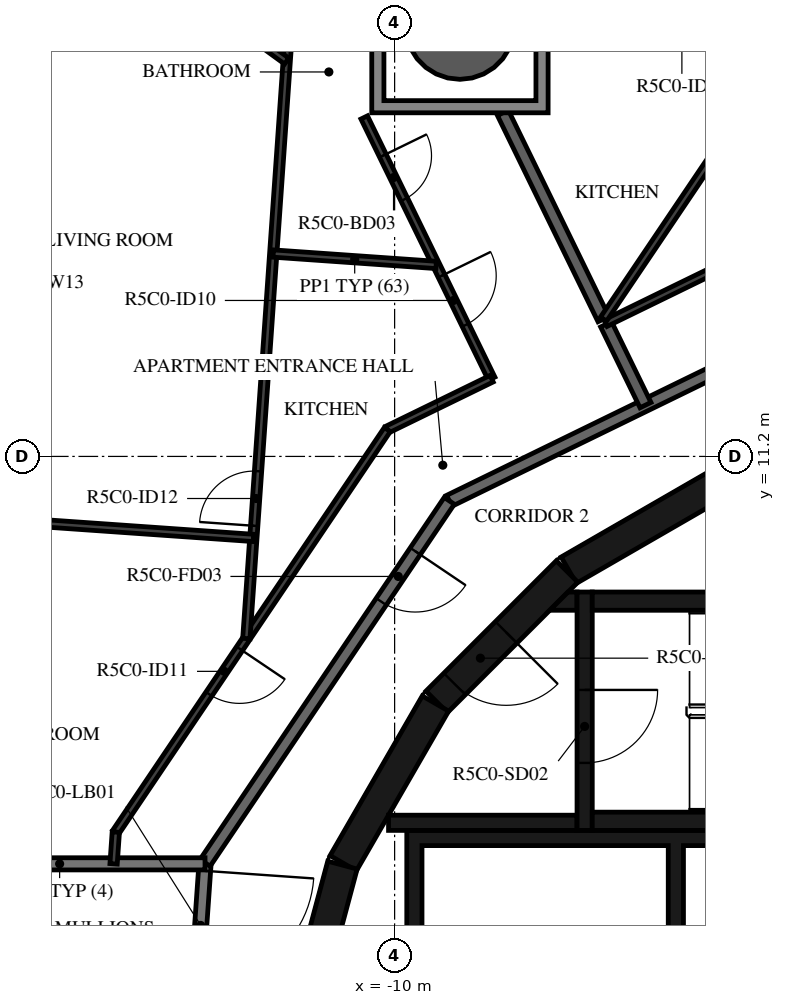
"""IFC4 building model, lengths in metres.
Left out: names, types, materials, properties, quantities, classifications, styles, units other than length and angle.
Written with IfcOpenShell. Run it as: python <this file> out.ifc"""

import sys

from ifc_helpers import new_model, si_unit, direction, frame, frame_2d, origin, origin_2d, place, context, subcontext, project, spatial, polyline, rectangle, hollow_circle, outline, extrude, element, fill, save


model = new_model("IFC4")
c1 = context("Model", 3, precision=1e-05, world=origin(), true_north=direction((0.0, 1.0)))
c2 = subcontext(c1, "Body", "Model", "MODEL_VIEW")
j1 = project(units=[si_unit("LENGTHUNIT", "METRE"), si_unit("PLANEANGLEUNIT", "RADIAN")], contexts=[c1])
p1 = place(None, origin())
s1 = spatial("IfcSite", under=j1, at=p1, CompositionType="ELEMENT")
p2 = place(p1, origin())
s2 = spatial("IfcBuilding", under=s1, at=p2, CompositionType="ELEMENT")
p3 = place(p2, frame((0.0, 0.0, 216.4)))
s3 = spatial("IfcBuildingStorey", under=s2, at=p3, CompositionType="ELEMENT", Elevation=216.4)
p4 = place(p3, frame((-8.926, 18.301, -0.38), z_axis=(0.0, 0.0, 1.0), x_axis=(1.0, 0.0, 0.0)))
e1 = element("IfcColumn", 1, at=p4, inside=s3, PredefinedType="COLUMN", context=c2, shape_type="SweptSolid", body=[
    extrude(hollow_circle(Radius=0.9, WallThickness=0.04, at=origin_2d()), origin(), (0.0, 0.0, 1.0), 2.616),
])
p5 = place(p3, frame((-4.51, 10.845, 0.0), z_axis=(0.0, 0.0, 1.0), x_axis=(-0.865975092491, -0.500087131594, 0.0)))
e2 = element("IfcWall", 2, at=p5, inside=s3, PredefinedType="SHEAR", context=c2, shape_type="SweptSolid", body=[
    extrude(rectangle(XDim=3.033, YDim=0.5, at=frame_2d((1.516, 0.0))), origin(), (0.0, 0.0, 1.0), 3.05),
])
p6 = place(p3, frame((-7.164, 9.308, 0.0), z_axis=(0.0, 0.0, 1.0), x_axis=(-0.707106781187, -0.707106781187, 0.0)))
e3 = element("IfcWall", 3, at=p6, inside=s3, PredefinedType="SHEAR", context=c2, shape_type="SweptSolid", body=[
    extrude(rectangle(XDim=3.032, YDim=0.5, at=frame_2d((1.516, 0.0))), origin(), (0.0, 0.0, 1.0), 3.05),
])
p7 = place(p6, frame((1.416, 0.0, 0.0)))
e4 = element("IfcOpeningElement", 4, at=p7, cuts=e3, PredefinedType="OPENING", context=c2, shape_type="SweptSolid", body=[
    extrude(rectangle(XDim=1.2, YDim=2.1, at=frame_2d((0.6, 1.05))), frame((0.0, 0.26, 0.0), z_axis=(0.0, -1.0, 0.0), x_axis=(1.0, 0.0, 0.0)), (0.0, 0.0, 1.0), 0.52),
])
for number, where, z_axis, x_axis in (
    (5, (-9.329, 7.137, 0.0), (0.0, 0.0, 1.0), (-0.5, -0.866, 0.0)),
    (6, (-10.858, 4.479, 0.0), (0.0, 0.0, 1.0), (-0.259, -0.966, 0.0)),
):
    element("IfcWall", number, at=place(p3, frame(where, z_axis=z_axis, x_axis=x_axis)), inside=s3, PredefinedType="SHEAR", context=c2, shape_type="SweptSolid", body=[
        extrude(rectangle(XDim=3.033, YDim=0.5, at=frame_2d((1.516, 0.0))), origin(), (0.0, 0.0, 1.0), 3.05),
    ])
for number, where, z_axis, x_axis in (
    (7, (-6.75, 5.2, 0.0), (0.0, 0.0, 1.0), (1.0, 0.0, 0.0)),
    (8, (-6.75, 8.82, 0.0), (0.0, 0.0, 1.0), (1.0, 0.0, 0.0)),
):
    element("IfcWall", number, at=place(p3, frame(where, z_axis=z_axis, x_axis=x_axis)), inside=s3, PredefinedType="SHEAR", context=c2, shape_type="SweptSolid", body=[
        extrude(rectangle(XDim=6.75, YDim=0.3, at=frame_2d((3.375, 0.0))), origin(), (0.0, 0.0, 1.0), 3.05),
    ])
p8 = place(p3, frame((-6.875, 8.97, 0.0), z_axis=(0.0, 0.0, 1.0), x_axis=(0.0, -1.0, 0.0)))
e9 = element("IfcWall", 9, at=p8, inside=s3, PredefinedType="SHEAR", context=c2, shape_type="SweptSolid", body=[
    extrude(rectangle(XDim=3.92, YDim=0.25, at=frame_2d((1.96, 0.0))), origin(), (0.0, 0.0, 1.0), 3.05),
])
p9 = place(p8, frame((1.61, 0.0, 0.0)))
e10 = element("IfcOpeningElement", 10, at=p9, cuts=e9, PredefinedType="OPENING", context=c2, shape_type="SweptSolid", body=[
    extrude(rectangle(XDim=1.2, YDim=2.1, at=frame_2d((0.6, 1.05))), frame((0.0, 0.135, 0.0), z_axis=(0.0, -1.0, 0.0), x_axis=(1.0, 0.0, 0.0)), (0.0, 0.0, 1.0), 0.27),
])
p10 = place(p3, frame((-7.0, 5.175, 0.0), z_axis=(0.0, 0.0, 1.0), x_axis=(-1.0, 0.0, 0.0)))
e11 = element("IfcWall", 11, at=p10, inside=s3, PredefinedType="SHEAR", context=c2, shape_type="SweptSolid", body=[
    extrude(rectangle(XDim=3.1, YDim=0.25, at=frame_2d((1.55, 0.0))), origin(), (0.0, 0.0, 1.0), 3.05),
])
p11 = place(p3, origin())
e12 = element("IfcWall", 12, at=p11, inside=s3, PredefinedType="SHEAR", context=c2, shape_type="SweptSolid", body=[
    extrude(outline(polyline([(-7.148, 8.97), (-7.0, 8.97), (-7.0, 8.67), (-7.448, 8.67), (-7.148, 8.97)])), origin(), (0.0, 0.0, 1.0), 3.05),
])
p12 = place(p3, origin())
e13 = element("IfcWall", 13, at=p12, inside=s3, PredefinedType="SHEAR", context=c2, shape_type="SweptSolid", body=[
    extrude(outline(polyline([(-9.55, 4.8), (-5.5, 4.8), (-5.5, 1.9), (-5.25, 1.9), (-5.25, 4.8), (-1.2, 4.8), (-1.2, 1.9), (-0.95, 1.9), (-0.95, 4.8), (0.95, 4.8), (0.95, 1.9), (1.2, 1.9), (1.2, 4.8), (3.1, 4.8), (3.1, 1.9), (3.35, 1.9), (3.35, 4.8), (5.25, 4.8), (5.25, 1.9), (5.5, 1.9), (5.5, 4.8), (7.4, 4.8), (7.4, 1.9), (7.65, 1.9), (7.65, 4.8), (9.55, 4.8), (9.55, 1.9), (9.8, 1.9), (9.8, 4.8), (9.8, 5.05), (-9.8, 5.05), (-9.8, 4.8), (-9.8, 1.9), (-9.55, 1.9), (-9.55, 4.8)])), origin(), (0.0, 0.0, 1.0), 3.05),
])
p13 = place(p3, frame((-13.118, 4.5, 0.0), z_axis=(0.0, 0.0, 1.0), x_axis=(-0.069746872611, -0.99756472159, 0.0)))
e14 = element("IfcWall", 14, at=p13, inside=s3, PredefinedType="STANDARD", context=c2, shape_type="SweptSolid", body=[
    extrude(rectangle(XDim=3.574, YDim=0.2, at=frame_2d((1.787, 0.0))), origin(), (0.0, 0.0, 1.0), 3.05),
])
p14 = place(p13, frame((0.115, 0.0, 0.0)))
e15 = element("IfcOpeningElement", 15, at=p14, cuts=e14, PredefinedType="OPENING", context=c2, shape_type="SweptSolid", body=[
    extrude(rectangle(XDim=1.8, YDim=2.1, at=frame_2d((0.9, 1.05))), frame((0.0, 0.11, 0.0), z_axis=(0.0, -1.0, 0.0), x_axis=(1.0, 0.0, 0.0)), (0.0, 0.0, 1.0), 0.22),
])
p15 = place(p3, frame((-2.647, 13.618, 0.0), z_axis=(0.0, 0.0, 1.0), x_axis=(-0.898796543751, -0.438366026218, 0.0)))
e16 = element("IfcWall", 16, at=p15, inside=s3, PredefinedType="STANDARD", context=c2, shape_type="SweptSolid", body=[
    extrude(rectangle(XDim=7.181, YDim=0.2, at=frame_2d((3.591, 0.0))), origin(), (0.0, 0.0, 1.0), 3.05),
])
p16 = place(p3, frame((-9.101, 10.47, 0.0), z_axis=(0.0, 0.0, 1.0), x_axis=(-0.559195469534, -0.829035841718, 0.0)))
e17 = element("IfcWall", 17, at=p16, inside=s3, PredefinedType="STANDARD", context=c2, shape_type="SweptSolid", body=[
    extrude(rectangle(XDim=7.181, YDim=0.2, at=frame_2d((3.591, 0.0))), origin(), (0.0, 0.0, 1.0), 3.05),
])
p17 = place(p16, frame((1.0, 0.0, 0.0)))
e18 = element("IfcOpeningElement", 18, at=p17, cuts=e17, PredefinedType="OPENING", context=c2, shape_type="SweptSolid", body=[
    extrude(rectangle(XDim=1.0, YDim=2.1, at=frame_2d((0.5, 1.05))), frame((0.0, 0.11, 0.0), z_axis=(0.0, -1.0, 0.0), x_axis=(1.0, 0.0, 0.0)), (0.0, 0.0, 1.0), 0.22),
])
p18 = place(p3, frame((-13.118, 4.5, 0.0), z_axis=(0.0, 0.0, 1.0), x_axis=(-1.0, 0.0, 0.0)))
e19 = element("IfcWall", 19, at=p18, inside=s3, PredefinedType="STANDARD", context=c2, shape_type="SweptSolid", body=[
    extrude(rectangle(XDim=4.782, YDim=0.2, at=frame_2d((2.391, 0.0))), origin(), (0.0, 0.0, 1.0), 3.05),
])
p19 = place(p3, frame((-6.522, 13.373, 0.0), z_axis=(0.0, 0.0, 1.0), x_axis=(0.438277270821, -0.8988398266, 0.0)))
e20 = element("IfcWall", 20, at=p19, inside=s3, PredefinedType="STANDARD", context=c2, shape_type="SweptSolid", body=[
    extrude(rectangle(XDim=1.479, YDim=0.2, at=frame_2d((0.74, 0.0))), origin(), (0.0, 0.0, 1.0), 3.05),
])
p20 = place(p3, frame((-8.219, 16.851, 0.0), z_axis=(0.0, 0.0, 1.0), x_axis=(0.438291091101, -0.898833087654, 0.0)))
e21 = element("IfcWall", 21, at=p20, inside=s3, PredefinedType="STANDARD", context=c2, shape_type="SweptSolid", body=[
    extrude(rectangle(XDim=3.774, YDim=0.2, at=frame_2d((1.887, 0.0))), origin(), (0.0, 0.0, 1.0), 3.05),
])
p21 = place(p3, frame((-2.943, 15.142, 0.0), z_axis=(0.0, 0.0, 1.0), x_axis=(-0.89881075705, -0.438336883014, 0.0)))
e22 = element("IfcWall", 22, at=p21, inside=s3, PredefinedType="PARTITIONING", context=c2, shape_type="SweptSolid", body=[
    extrude(rectangle(XDim=3.992, YDim=0.12, at=frame_2d((1.996, 0.0))), origin(), (0.0, 0.0, 1.0), 3.05),
])
p22 = place(p3, frame((-7.476, 19.735, 0.0), z_axis=(0.0, 0.0, 1.0), x_axis=(0.829035412992, -0.559196105142, 0.0)))
e23 = element("IfcWall", 23, at=p22, inside=s3, PredefinedType="PARTITIONING", context=c2, shape_type="SweptSolid", body=[
    extrude(rectangle(XDim=8.531, YDim=0.12, at=frame_2d((4.266, 0.0))), origin(), (0.0, 0.0, 1.0), 3.05),
])
p23 = place(p22, frame((2.204, 0.0, 0.0)))
e24 = element("IfcOpeningElement", 24, at=p23, cuts=e23, PredefinedType="OPENING", context=c2, shape_type="SweptSolid", body=[
    extrude(rectangle(XDim=0.9, YDim=2.1, at=frame_2d((0.45, 1.05))), frame((0.0, 0.07, 0.0), z_axis=(0.0, -1.0, 0.0), x_axis=(1.0, 0.0, 0.0)), (0.0, 0.0, 1.0), 0.14),
])
p24 = place(p3, frame((-3.939, 17.35, 0.0), z_axis=(0.0, 0.0, 1.0), x_axis=(-0.559193216274, -0.829037361566, 0.0)))
e25 = element("IfcWall", 25, at=p24, inside=s3, PredefinedType="PARTITIONING", context=c2, shape_type="SweptSolid", body=[
    extrude(rectangle(XDim=4.694, YDim=0.12, at=frame_2d((2.347, 0.0))), origin(), (0.0, 0.0, 1.0), 3.05),
])
p25 = place(p3, frame((-10.5, 16.775, 0.0), z_axis=(0.0, 0.0, 1.0), x_axis=(0.438345136783, -0.898806731761, 0.0)))
e26 = element("IfcWall", 26, at=p25, inside=s3, PredefinedType="PARTITIONING", context=c2, shape_type="SweptSolid", body=[
    extrude(rectangle(XDim=4.78, YDim=0.12, at=frame_2d((2.39, 0.0))), origin(), (0.0, 0.0, 1.0), 3.05),
])
p26 = place(p25, frame((0.7, 0.0, 0.0)))
e27 = element("IfcOpeningElement", 27, at=p26, cuts=e26, PredefinedType="OPENING", context=c2, shape_type="SweptSolid", body=[
    extrude(rectangle(XDim=0.8, YDim=2.1, at=frame_2d((0.4, 1.05))), frame((0.0, 0.07, 0.0), z_axis=(0.0, -1.0, 0.0), x_axis=(1.0, 0.0, 0.0)), (0.0, 0.0, 1.0), 0.14),
])
p27 = place(p25, frame((2.899, 0.0, 0.0)))
e28 = element("IfcOpeningElement", 28, at=p27, cuts=e26, PredefinedType="OPENING", context=c2, shape_type="SweptSolid", body=[
    extrude(rectangle(XDim=0.9, YDim=2.1, at=frame_2d((0.45, 1.05))), frame((0.0, 0.07, 0.0), z_axis=(0.0, -1.0, 0.0), x_axis=(1.0, 0.0, 0.0)), (0.0, 0.0, 1.0), 0.14),
])
p28 = place(p3, frame((-8.405, 12.479, 0.0), z_axis=(0.0, 0.0, 1.0), x_axis=(-0.898784427692, -0.438390867307, 0.0)))
e29 = element("IfcWall", 29, at=p28, inside=s3, PredefinedType="PARTITIONING", context=c2, shape_type="SweptSolid", body=[
    extrude(rectangle(XDim=1.908, YDim=0.12, at=frame_2d((0.954, 0.0))), origin(), (0.0, 0.0, 1.0), 3.05),
])
p29 = place(p3, frame((-10.12, 11.642, 0.0), z_axis=(0.0, 0.0, 1.0), x_axis=(-0.55920080659, -0.829032241779, 0.0)))
e30 = element("IfcWall", 30, at=p29, inside=s3, PredefinedType="PARTITIONING", context=c2, shape_type="SweptSolid", body=[
    extrude(rectangle(XDim=7.985, YDim=0.12, at=frame_2d((3.992, 0.0))), origin(), (0.0, 0.0, 1.0), 3.05),
])
p30 = place(p29, frame((4.346, 0.0, 0.0)))
e31 = element("IfcOpeningElement", 31, at=p30, cuts=e30, PredefinedType="OPENING", context=c2, shape_type="SweptSolid", body=[
    extrude(rectangle(XDim=0.9, YDim=2.1, at=frame_2d((0.45, 1.05))), frame((0.0, 0.07, 0.0), z_axis=(0.0, -1.0, 0.0), x_axis=(1.0, 0.0, 0.0)), (0.0, 0.0, 1.0), 0.14),
])
p31 = place(p3, frame((-14.585, 5.022, 0.0), z_axis=(0.0, 0.0, 1.0), x_axis=(-0.069490327804, -0.997582625321, 0.0)))
e32 = element("IfcWall", 32, at=p31, inside=s3, PredefinedType="PARTITIONING", context=c2, shape_type="SweptSolid", body=[
    extrude(rectangle(XDim=0.523, YDim=0.12, at=frame_2d((0.262, 0.0))), origin(), (0.0, 0.0, 1.0), 3.05),
])
p32 = place(p3, frame((-12.439, 8.204, 0.0), z_axis=(0.0, 0.0, 1.0), x_axis=(0.069750037523, 0.997564500303, 0.0)))
e33 = element("IfcWall", 33, at=p32, inside=s3, PredefinedType="PARTITIONING", context=c2, shape_type="SweptSolid", body=[
    extrude(rectangle(XDim=10.014, YDim=0.12, at=frame_2d((5.007, 0.0))), origin(), (0.0, 0.0, 1.0), 3.05),
])
p33 = place(p32, frame((1.859, 0.0, 0.0)))
e34 = element("IfcOpeningElement", 34, at=p33, cuts=e33, PredefinedType="OPENING", context=c2, shape_type="SweptSolid", body=[
    extrude(rectangle(XDim=0.9, YDim=2.1, at=frame_2d((0.45, 1.05))), frame((0.0, 0.07, 0.0), z_axis=(0.0, -1.0, 0.0), x_axis=(1.0, 0.0, 0.0)), (0.0, 0.0, 1.0), 0.14),
])
p34 = place(p3, frame((-16.395, 21.061, 0.0), z_axis=(0.0, 0.0, 1.0), x_axis=(0.808810002497, -0.58807004673, 0.0)))
e35 = element("IfcWall", 35, at=p34, inside=s3, PredefinedType="PARTITIONING", context=c2, shape_type="SweptSolid", body=[
    extrude(rectangle(XDim=5.713, YDim=0.12, at=frame_2d((2.856, 0.0))), origin(), (0.0, 0.0, 1.0), 3.05),
])
p35 = place(p34, frame((0.2, 0.0, 0.0)))
e36 = element("IfcOpeningElement", 36, at=p35, cuts=e35, PredefinedType="OPENING", context=c2, shape_type="SweptSolid", body=[
    extrude(rectangle(XDim=0.9, YDim=2.1, at=frame_2d((0.45, 1.05))), frame((0.0, 0.07, 0.0), z_axis=(0.0, -1.0, 0.0), x_axis=(1.0, 0.0, 0.0)), (0.0, 0.0, 1.0), 0.14),
])
p36 = place(p3, frame((-11.996, 14.536, 0.0), z_axis=(0.0, 0.0, 1.0), x_axis=(0.997565991425, -0.069728708231, 0.0)))
e37 = element("IfcWall", 37, at=p36, inside=s3, PredefinedType="PARTITIONING", context=c2, shape_type="SweptSolid", body=[
    extrude(rectangle(XDim=2.686, YDim=0.12, at=frame_2d((1.343, 0.0))), origin(), (0.0, 0.0, 1.0), 3.05),
])
p37 = place(p3, frame((-17.51, 10.222, 0.0), z_axis=(0.0, 0.0, 1.0), x_axis=(0.997563184303, -0.069768856397, 0.0)))
e38 = element("IfcWall", 38, at=p37, inside=s3, PredefinedType="PARTITIONING", context=c2, shape_type="SweptSolid", body=[
    extrude(rectangle(XDim=5.2, YDim=0.12, at=frame_2d((2.6, 0.0))), origin(), (0.0, 0.0, 1.0), 3.05),
])
p38 = place(p3, origin())
e39 = element("IfcWall", 39, at=p38, inside=s3, PredefinedType="STANDARD", context=c2, shape_type="SweptSolid", body=[
    extrude(outline(polyline([(-7.476, 19.751), (-7.476, 16.851), (-10.376, 16.851), (-10.376, 19.751), (-7.476, 19.751)]), holes=[polyline([(-10.176, 17.051), (-7.676, 17.051), (-7.676, 19.551), (-10.176, 19.551), (-10.176, 17.051)])]), origin(), (0.0, 0.0, 1.0), 3.05),
])
p39 = place(p9, origin())
e40 = element("IfcDoor", 40, at=p39, inside=s3, OperationType="SINGLE_SWING_LEFT", PredefinedType="DOOR", context=c2, shape_type="SweptSolid", body=[
    extrude(rectangle(XDim=1.2, YDim=2.1, at=frame_2d((0.6, 1.05))), frame((0.0, 0.025, 0.0), z_axis=(0.0, -1.0, 0.0), x_axis=(1.0, 0.0, 0.0)), (0.0, 0.0, 1.0), 0.05),
])
fill(e10, e40)
p40 = place(p7, origin())
e41 = element("IfcDoor", 41, at=p40, inside=s3, OperationType="SINGLE_SWING_RIGHT", PredefinedType="DOOR", context=c2, shape_type="SweptSolid", body=[
    extrude(rectangle(XDim=1.2, YDim=2.1, at=frame_2d((0.6, 1.05))), frame((0.0, 0.025, 0.0), z_axis=(0.0, -1.0, 0.0), x_axis=(1.0, 0.0, 0.0)), (0.0, 0.0, 1.0), 0.05),
])
fill(e4, e41)
p41 = place(p17, origin())
e42 = element("IfcDoor", 42, at=p41, inside=s3, OperationType="SINGLE_SWING_LEFT", PredefinedType="DOOR", context=c2, shape_type="SweptSolid", body=[
    extrude(rectangle(XDim=1.0, YDim=2.1, at=frame_2d((0.5, 1.05))), frame((0.0, 0.025, 0.0), z_axis=(0.0, -1.0, 0.0), x_axis=(1.0, 0.0, 0.0)), (0.0, 0.0, 1.0), 0.05),
])
fill(e18, e42)
p42 = place(p26, origin())
e43 = element("IfcDoor", 43, at=p42, inside=s3, OperationType="SINGLE_SWING_LEFT", PredefinedType="DOOR", context=c2, shape_type="SweptSolid", body=[
    extrude(rectangle(XDim=0.8, YDim=2.1, at=frame_2d((0.4, 1.05))), frame((0.0, 0.025, 0.0), z_axis=(0.0, -1.0, 0.0), x_axis=(1.0, 0.0, 0.0)), (0.0, 0.0, 1.0), 0.05),
])
fill(e27, e43)
p43 = place(p27, origin())
e44 = element("IfcDoor", 44, at=p43, inside=s3, OperationType="SINGLE_SWING_LEFT", PredefinedType="DOOR", context=c2, shape_type="SweptSolid", body=[
    extrude(rectangle(XDim=0.9, YDim=2.1, at=frame_2d((0.45, 1.05))), frame((0.0, 0.025, 0.0), z_axis=(0.0, -1.0, 0.0), x_axis=(1.0, 0.0, 0.0)), (0.0, 0.0, 1.0), 0.05),
])
fill(e28, e44)
p44 = place(p30, origin())
e45 = element("IfcDoor", 45, at=p44, inside=s3, OperationType="SINGLE_SWING_LEFT", PredefinedType="DOOR", context=c2, shape_type="SweptSolid", body=[
    extrude(rectangle(XDim=0.9, YDim=2.1, at=frame_2d((0.45, 1.05))), frame((0.0, 0.025, 0.0), z_axis=(0.0, -1.0, 0.0), x_axis=(1.0, 0.0, 0.0)), (0.0, 0.0, 1.0), 0.05),
])
fill(e31, e45)
p45 = place(p33, origin())
e46 = element("IfcDoor", 46, at=p45, inside=s3, OperationType="SINGLE_SWING_LEFT", PredefinedType="DOOR", context=c2, shape_type="SweptSolid", body=[
    extrude(rectangle(XDim=0.9, YDim=2.1, at=frame_2d((0.45, 1.05))), frame((0.0, 0.025, 0.0), z_axis=(0.0, -1.0, 0.0), x_axis=(1.0, 0.0, 0.0)), (0.0, 0.0, 1.0), 0.05),
])
fill(e34, e46)
p46 = place(p14, origin())
e47 = element("IfcDoor", 47, at=p46, inside=s3, OperationType="DOUBLE_DOOR_SINGLE_SWING", PredefinedType="DOOR", context=c2, shape_type="SweptSolid", body=[
    extrude(rectangle(XDim=1.8, YDim=2.1, at=frame_2d((0.9, 1.05))), frame((0.0, 0.025, 0.0), z_axis=(0.0, -1.0, 0.0), x_axis=(1.0, 0.0, 0.0)), (0.0, 0.0, 1.0), 0.05),
])
fill(e15, e47)
save(model, sys.argv[1])
